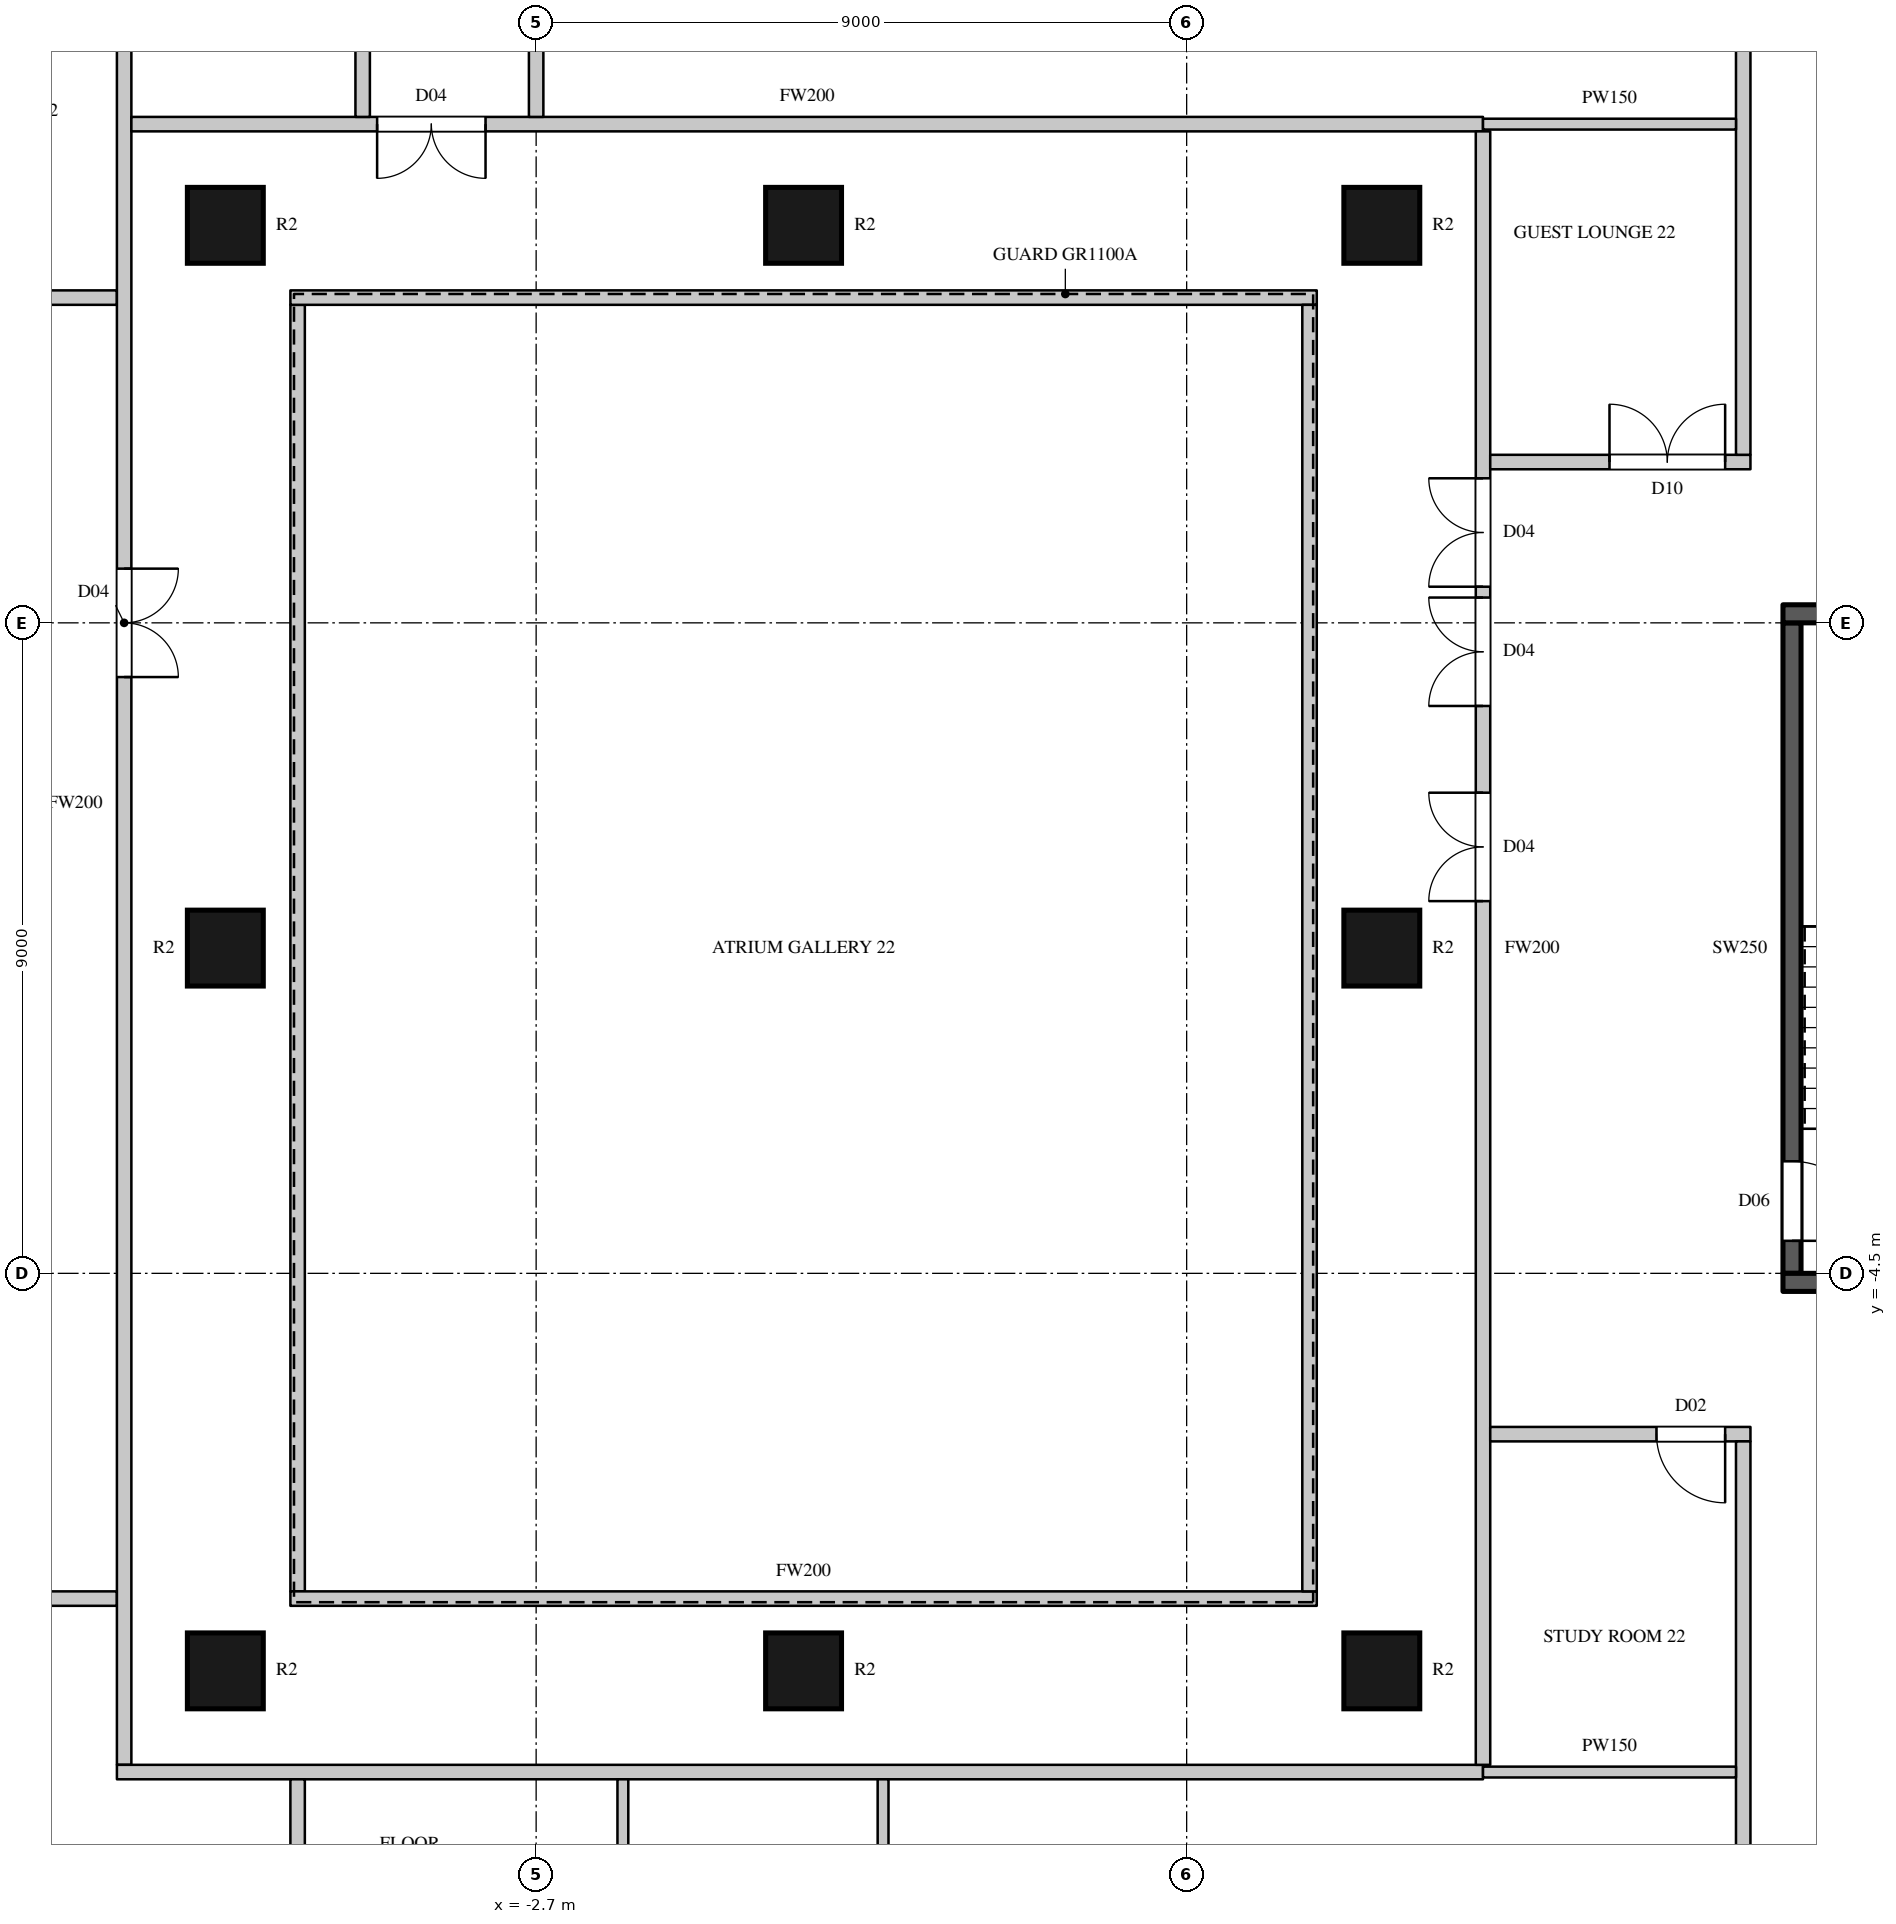
"""IFC4 building model, lengths in metres.
Left out: names, types, materials, properties, quantities, classifications, styles, units other than length and angle.
Written with IfcOpenShell. Run it as: python <this file> out.ifc"""

import sys

from ifc_helpers import new_model, si_unit, direction, frame, frame_2d, origin, origin_2d, place, context, subcontext, project, spatial, rectangle, circle, extrude, element, fill, save


model = new_model("IFC4")
c1 = context("Model", 3, precision=1e-05, world=origin(), true_north=direction((0.0, 1.0)))
c2 = subcontext(c1, "Body", "Model", "MODEL_VIEW")
j1 = project(units=[si_unit("LENGTHUNIT", "METRE"), si_unit("PLANEANGLEUNIT", "RADIAN")], contexts=[c1])
p1 = place(None, origin())
s1 = spatial("IfcSite", under=j1, at=p1, CompositionType="ELEMENT")
p2 = place(p1, origin())
s2 = spatial("IfcBuilding", under=s1, at=p2, CompositionType="ELEMENT")
p3 = place(p2, frame((0.0, 0.0, 109.5)))
s3 = spatial("IfcBuildingStorey", under=s2, at=p3, CompositionType="ELEMENT", Elevation=109.5)
for number, where, z_axis, x_axis in (
    (1, (-7.0, -10.0, 0.0), (0.0, 0.0, 1.0), (1.0, 0.0, 0.0)),
    (2, (-7.0, 0.0, 0.0), (0.0, 0.0, 1.0), (1.0, 0.0, 0.0)),
    (3, (-7.0, 10.0, 0.0), (0.0, 0.0, 1.0), (1.0, 0.0, 0.0)),
    (4, (1.0, -10.0, 0.0), (0.0, 0.0, 1.0), (1.0, 0.0, 0.0)),
    (5, (1.0, 10.0, 0.0), (0.0, 0.0, 1.0), (1.0, 0.0, 0.0)),
    (6, (9.0, -10.0, 0.0), (0.0, 0.0, 1.0), (1.0, 0.0, 0.0)),
    (7, (9.0, 0.0, 0.0), (0.0, 0.0, 1.0), (1.0, 0.0, 0.0)),
    (8, (9.0, 10.0, 0.0), (0.0, 0.0, 1.0), (1.0, 0.0, 0.0)),
):
    element("IfcColumn", number, at=place(p3, frame(where, z_axis=z_axis, x_axis=x_axis)), inside=s3, PredefinedType="COLUMN", context=c2, shape_type="SweptSolid", body=[
        extrude(circle(Radius=0.525, at=origin_2d()), origin(), (0.0, 0.0, 1.0), 3.6),
    ])
p4 = place(p3, frame((-13.97, -9.0, 0.0), z_axis=(0.0, 0.0, 1.0), x_axis=(1.0, 0.0, 0.0)))
e9 = element("IfcWall", 9, at=p4, inside=s3, PredefinedType="PARTITIONING", context=c2, shape_type="SweptSolid", body=[
    extrude(rectangle(XDim=5.47, YDim=0.2, at=frame_2d((2.735, 0.0))), origin(), (0.0, 0.0, 1.0), 3.3),
])
p5 = place(p4, frame((0.4, 0.0, 0.0)))
e10 = element("IfcOpeningElement", 10, at=p5, cuts=e9, PredefinedType="OPENING", context=c2, shape_type="SweptSolid", body=[
    extrude(rectangle(XDim=1.5, YDim=2.2, at=frame_2d((0.75, 1.1))), frame((0.0, 0.11, 0.0), z_axis=(0.0, -1.0, 0.0), x_axis=(1.0, 0.0, 0.0)), (0.0, 0.0, 1.0), 0.22),
])
p6 = place(p4, frame((2.05, 0.0, 0.0)))
e11 = element("IfcOpeningElement", 11, at=p6, cuts=e9, PredefinedType="OPENING", context=c2, shape_type="SweptSolid", body=[
    extrude(rectangle(XDim=1.5, YDim=2.2, at=frame_2d((0.75, 1.1))), frame((0.0, 0.11, 0.0), z_axis=(0.0, -1.0, 0.0), x_axis=(1.0, 0.0, 0.0)), (0.0, 0.0, 1.0), 0.22),
])
p7 = place(p3, frame((-13.97, 9.0, 0.0), z_axis=(0.0, 0.0, 1.0), x_axis=(1.0, 0.0, 0.0)))
e12 = element("IfcWall", 12, at=p7, inside=s3, PredefinedType="PARTITIONING", context=c2, shape_type="SweptSolid", body=[
    extrude(rectangle(XDim=5.47, YDim=0.2, at=frame_2d((2.735, 0.0))), origin(), (0.0, 0.0, 1.0), 3.3),
])
p8 = place(p3, frame((-8.4, -11.3, 0.0), z_axis=(0.0, 0.0, 1.0), x_axis=(0.0, 1.0, 0.0)))
e13 = element("IfcWall", 13, at=p8, inside=s3, PredefinedType="PARTITIONING", context=c2, shape_type="SweptSolid", body=[
    extrude(rectangle(XDim=26.6, YDim=0.2, at=frame_2d((13.3, 0.0))), origin(), (0.0, 0.0, 1.0), 3.3),
])
p9 = place(p8, frame((15.05, 0.0, 0.0)))
e14 = element("IfcOpeningElement", 14, at=p9, cuts=e13, PredefinedType="OPENING", context=c2, shape_type="SweptSolid", body=[
    extrude(rectangle(XDim=1.5, YDim=2.2, at=frame_2d((0.75, 1.1))), frame((0.0, 0.11, 0.0), z_axis=(0.0, -1.0, 0.0), x_axis=(1.0, 0.0, 0.0)), (0.0, 0.0, 1.0), 0.22),
])
p10 = place(p8, frame((25.55, 0.0, 0.0)))
e15 = element("IfcOpeningElement", 15, at=p10, cuts=e13, PredefinedType="OPENING", context=c2, shape_type="SweptSolid", body=[
    extrude(rectangle(XDim=0.9, YDim=2.2, at=frame_2d((0.45, 1.1))), frame((0.0, 0.11, 0.0), z_axis=(0.0, -1.0, 0.0), x_axis=(1.0, 0.0, 0.0)), (0.0, 0.0, 1.0), 0.22),
])
p11 = place(p3, frame((-8.5, -11.4, 0.0), z_axis=(0.0, 0.0, 1.0), x_axis=(1.0, 0.0, 0.0)))
e16 = element("IfcWall", 16, at=p11, inside=s3, PredefinedType="PARTITIONING", context=c2, shape_type="SweptSolid", body=[
    extrude(rectangle(XDim=18.9, YDim=0.2, at=frame_2d((9.45, 0.0))), origin(), (0.0, 0.0, 1.0), 3.3),
])
p12 = place(p3, frame((-8.3, 11.4, 0.0), z_axis=(0.0, 0.0, 1.0), x_axis=(1.0, 0.0, 0.0)))
e17 = element("IfcWall", 17, at=p12, inside=s3, PredefinedType="PARTITIONING", context=c2, shape_type="SweptSolid", body=[
    extrude(rectangle(XDim=18.7, YDim=0.2, at=frame_2d((9.35, 0.0))), origin(), (0.0, 0.0, 1.0), 3.3),
])
p13 = place(p12, frame((3.4, 0.0, 0.0)))
e18 = element("IfcOpeningElement", 18, at=p13, cuts=e17, PredefinedType="OPENING", context=c2, shape_type="SweptSolid", body=[
    extrude(rectangle(XDim=1.5, YDim=2.2, at=frame_2d((0.75, 1.1))), frame((0.0, 0.11, 0.0), z_axis=(0.0, -1.0, 0.0), x_axis=(1.0, 0.0, 0.0)), (0.0, 0.0, 1.0), 0.22),
])
p14 = place(p3, frame((-6.0, -15.3, 0.0), z_axis=(0.0, 0.0, 1.0), x_axis=(0.0, 1.0, 0.0)))
e19 = element("IfcWall", 19, at=p14, inside=s3, PredefinedType="PARTITIONING", context=c2, shape_type="SweptSolid", body=[
    extrude(rectangle(XDim=3.8, YDim=0.2, at=frame_2d((1.9, 0.0))), origin(), (0.0, 0.0, 1.0), 3.3),
])
p15 = place(p14, frame((0.15, 0.0, 0.0)))
e20 = element("IfcOpeningElement", 20, at=p15, cuts=e19, PredefinedType="OPENING", context=c2, shape_type="SweptSolid", body=[
    extrude(rectangle(XDim=0.95, YDim=2.2, at=frame_2d((0.475, 1.1))), frame((0.0, 0.11, 0.0), z_axis=(0.0, -1.0, 0.0), x_axis=(1.0, 0.0, 0.0)), (0.0, 0.0, 1.0), 0.22),
])
p16 = place(p3, frame((-6.0, -8.9, 0.0), z_axis=(0.0, 0.0, 1.0), x_axis=(0.0, 1.0, 0.0)))
e21 = element("IfcWall", 21, at=p16, inside=s3, PredefinedType="PARTITIONING", context=c2, shape_type="SweptSolid", body=[
    extrude(rectangle(XDim=17.8, YDim=0.2, at=frame_2d((8.9, 0.0))), origin(), (0.0, 0.0, 1.0), 3.3),
])
for number, where, z_axis, x_axis in (
    (22, (-6.1, -9.0, 0.0), (0.0, 0.0, 1.0), (1.0, 0.0, 0.0)),
    (23, (-6.1, 9.0, 0.0), (0.0, 0.0, 1.0), (1.0, 0.0, 0.0)),
):
    element("IfcWall", number, at=place(p3, frame(where, z_axis=z_axis, x_axis=x_axis)), inside=s3, PredefinedType="PARTITIONING", context=c2, shape_type="SweptSolid", body=[
        extrude(rectangle(XDim=14.2, YDim=0.2, at=frame_2d((7.1, 0.0))), origin(), (0.0, 0.0, 1.0), 3.3),
    ])
p17 = place(p3, frame((-5.1, 11.5, 0.0), z_axis=(0.0, 0.0, 1.0), x_axis=(0.0, 1.0, 0.0)))
e24 = element("IfcWall", 24, at=p17, inside=s3, PredefinedType="PARTITIONING", context=c2, shape_type="SweptSolid", body=[
    extrude(rectangle(XDim=3.8, YDim=0.2, at=frame_2d((1.9, 0.0))), origin(), (0.0, 0.0, 1.0), 3.3),
])
p18 = place(p3, frame((-2.7, 11.5, 0.0), z_axis=(0.0, 0.0, 1.0), x_axis=(0.0, 1.0, 0.0)))
e25 = element("IfcWall", 25, at=p18, inside=s3, PredefinedType="PARTITIONING", context=c2, shape_type="SweptSolid", body=[
    extrude(rectangle(XDim=3.8, YDim=0.2, at=frame_2d((1.9, 0.0))), origin(), (0.0, 0.0, 1.0), 2.75),
])
p19 = place(p18, frame((2.75, 0.0, 0.0)))
e26 = element("IfcOpeningElement", 26, at=p19, cuts=e25, PredefinedType="OPENING", context=c2, shape_type="SweptSolid", body=[
    extrude(rectangle(XDim=0.9, YDim=2.2, at=frame_2d((0.45, 1.1))), frame((0.0, 0.11, 0.0), z_axis=(0.0, -1.0, 0.0), x_axis=(1.0, 0.0, 0.0)), (0.0, 0.0, 1.0), 0.22),
])
p20 = place(p3, frame((8.0, -8.9, 0.0), z_axis=(0.0, 0.0, 1.0), x_axis=(0.0, 1.0, 0.0)))
e27 = element("IfcWall", 27, at=p20, inside=s3, PredefinedType="PARTITIONING", context=c2, shape_type="SweptSolid", body=[
    extrude(rectangle(XDim=17.8, YDim=0.2, at=frame_2d((8.9, 0.0))), origin(), (0.0, 0.0, 1.0), 3.3),
])
p21 = place(p3, frame((10.4, -11.3, 0.0), z_axis=(0.0, 0.0, 1.0), x_axis=(0.0, 1.0, 0.0)))
e28 = element("IfcWall", 28, at=p21, inside=s3, PredefinedType="PARTITIONING", context=c2, shape_type="SweptSolid", body=[
    extrude(rectangle(XDim=22.6, YDim=0.2, at=frame_2d((11.3, 0.0))), origin(), (0.0, 0.0, 1.0), 3.3),
])
p22 = place(p21, frame((16.3, 0.0, 0.0)))
e29 = element("IfcOpeningElement", 29, at=p22, cuts=e28, PredefinedType="OPENING", context=c2, shape_type="SweptSolid", body=[
    extrude(rectangle(XDim=1.5, YDim=2.2, at=frame_2d((0.75, 1.1))), frame((0.0, 0.11, 0.0), z_axis=(0.0, -1.0, 0.0), x_axis=(1.0, 0.0, 0.0)), (0.0, 0.0, 1.0), 0.22),
])
p23 = place(p21, frame((14.65, 0.0, 0.0)))
e30 = element("IfcOpeningElement", 30, at=p23, cuts=e28, PredefinedType="OPENING", context=c2, shape_type="SweptSolid", body=[
    extrude(rectangle(XDim=1.5, YDim=2.2, at=frame_2d((0.75, 1.1))), frame((0.0, 0.11, 0.0), z_axis=(0.0, -1.0, 0.0), x_axis=(1.0, 0.0, 0.0)), (0.0, 0.0, 1.0), 0.22),
])
p24 = place(p21, frame((11.95, 0.0, 0.0)))
e31 = element("IfcOpeningElement", 31, at=p24, cuts=e28, PredefinedType="OPENING", context=c2, shape_type="SweptSolid", body=[
    extrude(rectangle(XDim=1.5, YDim=2.2, at=frame_2d((0.75, 1.1))), frame((0.0, 0.11, 0.0), z_axis=(0.0, -1.0, 0.0), x_axis=(1.0, 0.0, 0.0)), (0.0, 0.0, 1.0), 0.22),
])
p25 = place(p3, frame((10.5, -6.725, 0.0), z_axis=(0.0, 0.0, 1.0), x_axis=(1.0, 0.0, 0.0)))
e32 = element("IfcWall", 32, at=p25, inside=s3, PredefinedType="PARTITIONING", context=c2, shape_type="SweptSolid", body=[
    extrude(rectangle(XDim=3.6, YDim=0.2, at=frame_2d((1.8, 0.0))), origin(), (0.0, 0.0, 1.0), 3.3),
])
p26 = place(p25, frame((2.3, 0.0, 0.0)))
e33 = element("IfcOpeningElement", 33, at=p26, cuts=e32, PredefinedType="OPENING", context=c2, shape_type="SweptSolid", body=[
    extrude(rectangle(XDim=0.95, YDim=2.2, at=frame_2d((0.475, 1.1))), frame((0.0, 0.11, 0.0), z_axis=(0.0, -1.0, 0.0), x_axis=(1.0, 0.0, 0.0)), (0.0, 0.0, 1.0), 0.22),
])
p27 = place(p3, frame((10.5, 6.725, 0.0), z_axis=(0.0, 0.0, 1.0), x_axis=(1.0, 0.0, 0.0)))
e34 = element("IfcWall", 34, at=p27, inside=s3, PredefinedType="PARTITIONING", context=c2, shape_type="SweptSolid", body=[
    extrude(rectangle(XDim=3.6, YDim=0.2, at=frame_2d((1.8, 0.0))), origin(), (0.0, 0.0, 1.0), 3.3),
])
p28 = place(p27, frame((1.65, 0.0, 0.0)))
e35 = element("IfcOpeningElement", 35, at=p28, cuts=e34, PredefinedType="OPENING", context=c2, shape_type="SweptSolid", body=[
    extrude(rectangle(XDim=1.6, YDim=2.4, at=frame_2d((0.8, 1.2))), frame((0.0, 0.11, 0.0), z_axis=(0.0, -1.0, 0.0), x_axis=(1.0, 0.0, 0.0)), (0.0, 0.0, 1.0), 0.22),
])
for number, where, z_axis, x_axis in (
    (36, (14.0, -15.3, 0.0), (0.0, 0.0, 1.0), (0.0, 1.0, 0.0)),
    (37, (14.0, 6.825, 0.0), (0.0, 0.0, 1.0), (0.0, 1.0, 0.0)),
):
    element("IfcWall", number, at=place(p3, frame(where, z_axis=z_axis, x_axis=x_axis)), inside=s3, PredefinedType="PARTITIONING", context=c2, shape_type="SweptSolid", body=[
        extrude(rectangle(XDim=8.475, YDim=0.2, at=frame_2d((4.238, 0.0))), origin(), (0.0, 0.0, 1.0), 3.3),
    ])
for number, where, z_axis, x_axis in (
    (38, (-1.5, -15.3, 0.0), (0.0, 0.0, 1.0), (0.0, 1.0, 0.0)),
    (39, (2.1, -15.3, 0.0), (0.0, 0.0, 1.0), (0.0, 1.0, 0.0)),
):
    element("IfcWall", number, at=place(p3, frame(where, z_axis=z_axis, x_axis=x_axis)), inside=s3, PredefinedType="PARTITIONING", context=c2, shape_type="SweptSolid", body=[
        extrude(rectangle(XDim=3.8, YDim=0.15, at=frame_2d((1.9, 0.0))), origin(), (0.0, 0.0, 1.0), 3.3),
    ])
for number, where, z_axis, x_axis in (
    (40, (10.4, -11.4, 0.0), (0.0, 0.0, 1.0), (1.0, 0.0, 0.0)),
    (41, (10.4, 11.4, 0.0), (0.0, 0.0, 1.0), (1.0, 0.0, 0.0)),
):
    element("IfcWall", number, at=place(p3, frame(where, z_axis=z_axis, x_axis=x_axis)), inside=s3, PredefinedType="PARTITIONING", context=c2, shape_type="SweptSolid", body=[
        extrude(rectangle(XDim=3.5, YDim=0.15, at=frame_2d((1.75, 0.0))), origin(), (0.0, 0.0, 1.0), 3.3),
    ])
p29 = place(p3, frame((14.675, -4.5, 0.0), z_axis=(0.0, 0.0, 1.0), x_axis=(0.0, 1.0, 0.0)))
e42 = element("IfcWall", 42, at=p29, inside=s3, PredefinedType="SHEAR", context=c2, shape_type="SweptSolid", body=[
    extrude(rectangle(XDim=9.0, YDim=0.25, at=frame_2d((4.5, 0.0))), origin(), (0.0, 0.0, 1.0), 3.3),
])
p30 = place(p29, frame((0.45, 0.0, 0.0)))
e43 = element("IfcOpeningElement", 43, at=p30, cuts=e42, PredefinedType="OPENING", context=c2, shape_type="SweptSolid", body=[
    extrude(rectangle(XDim=1.1, YDim=2.2, at=frame_2d((0.55, 1.1))), frame((0.0, 0.135, 0.0), z_axis=(0.0, -1.0, 0.0), x_axis=(1.0, 0.0, 0.0)), (0.0, 0.0, 1.0), 0.27),
])
for number, where, z_axis, x_axis in (
    (44, (14.55, -4.625, 0.0), (0.0, 0.0, 1.0), (1.0, 0.0, 0.0)),
    (45, (14.55, 4.625, 0.0), (0.0, 0.0, 1.0), (1.0, 0.0, 0.0)),
):
    element("IfcWall", number, at=place(p3, frame(where, z_axis=z_axis, x_axis=x_axis)), inside=s3, PredefinedType="SHEAR", context=c2, shape_type="SweptSolid", body=[
        extrude(rectangle(XDim=4.7, YDim=0.25, at=frame_2d((2.35, 0.0))), origin(), (0.0, 0.0, 1.0), 3.3),
    ])
p31 = place(p9, origin())
e46 = element("IfcDoor", 46, at=p31, inside=s3, OperationType="DOUBLE_DOOR_SINGLE_SWING", PredefinedType="DOOR", context=c2, shape_type="SweptSolid", body=[
    extrude(rectangle(XDim=1.5, YDim=2.2, at=frame_2d((0.75, 1.1))), frame((0.0, 0.025, 0.0), z_axis=(0.0, -1.0, 0.0), x_axis=(1.0, 0.0, 0.0)), (0.0, 0.0, 1.0), 0.05),
])
fill(e14, e46)
p32 = place(p13, origin())
e47 = element("IfcDoor", 47, at=p32, inside=s3, OperationType="DOUBLE_DOOR_SINGLE_SWING", PredefinedType="DOOR", context=c2, shape_type="SweptSolid", body=[
    extrude(rectangle(XDim=1.5, YDim=2.2, at=frame_2d((0.75, 1.1))), frame((0.0, 0.025, 0.0), z_axis=(0.0, -1.0, 0.0), x_axis=(1.0, 0.0, 0.0)), (0.0, 0.0, 1.0), 0.05),
])
fill(e18, e47)
p33 = place(p22, origin())
e48 = element("IfcDoor", 48, at=p33, inside=s3, OperationType="DOUBLE_DOOR_SINGLE_SWING", PredefinedType="DOOR", context=c2, shape_type="SweptSolid", body=[
    extrude(rectangle(XDim=1.5, YDim=2.2, at=frame_2d((0.75, 1.1))), frame((0.0, 0.025, 0.0), z_axis=(0.0, -1.0, 0.0), x_axis=(1.0, 0.0, 0.0)), (0.0, 0.0, 1.0), 0.05),
])
fill(e29, e48)
p34 = place(p23, origin())
e49 = element("IfcDoor", 49, at=p34, inside=s3, OperationType="DOUBLE_DOOR_SINGLE_SWING", PredefinedType="DOOR", context=c2, shape_type="SweptSolid", body=[
    extrude(rectangle(XDim=1.5, YDim=2.2, at=frame_2d((0.75, 1.1))), frame((0.0, 0.025, 0.0), z_axis=(0.0, -1.0, 0.0), x_axis=(1.0, 0.0, 0.0)), (0.0, 0.0, 1.0), 0.05),
])
fill(e30, e49)
p35 = place(p24, origin())
e50 = element("IfcDoor", 50, at=p35, inside=s3, OperationType="DOUBLE_DOOR_SINGLE_SWING", PredefinedType="DOOR", context=c2, shape_type="SweptSolid", body=[
    extrude(rectangle(XDim=1.5, YDim=2.2, at=frame_2d((0.75, 1.1))), frame((0.0, 0.025, 0.0), z_axis=(0.0, -1.0, 0.0), x_axis=(1.0, 0.0, 0.0)), (0.0, 0.0, 1.0), 0.05),
])
fill(e31, e50)
p36 = place(p26, origin())
e51 = element("IfcDoor", 51, at=p36, inside=s3, OperationType="SINGLE_SWING_LEFT", PredefinedType="DOOR", context=c2, shape_type="SweptSolid", body=[
    extrude(rectangle(XDim=0.95, YDim=2.2, at=frame_2d((0.475, 1.1))), frame((0.0, 0.025, 0.0), z_axis=(0.0, -1.0, 0.0), x_axis=(1.0, 0.0, 0.0)), (0.0, 0.0, 1.0), 0.05),
])
fill(e33, e51)
p37 = place(p28, origin())
e52 = element("IfcDoor", 52, at=p37, inside=s3, OperationType="DOUBLE_DOOR_SINGLE_SWING", PredefinedType="DOOR", context=c2, shape_type="SweptSolid", body=[
    extrude(rectangle(XDim=1.6, YDim=2.4, at=frame_2d((0.8, 1.2))), frame((0.0, 0.025, 0.0), z_axis=(0.0, -1.0, 0.0), x_axis=(1.0, 0.0, 0.0)), (0.0, 0.0, 1.0), 0.05),
])
fill(e35, e52)
p38 = place(p30, origin())
e53 = element("IfcDoor", 53, at=p38, inside=s3, OperationType="SINGLE_SWING_RIGHT", PredefinedType="DOOR", context=c2, shape_type="SweptSolid", body=[
    extrude(rectangle(XDim=1.1, YDim=2.2, at=frame_2d((0.55, 1.1))), frame((0.0, 0.025, 0.0), z_axis=(0.0, -1.0, 0.0), x_axis=(1.0, 0.0, 0.0)), (0.0, 0.0, 1.0), 0.05),
])
fill(e43, e53)
save(model, sys.argv[1])
